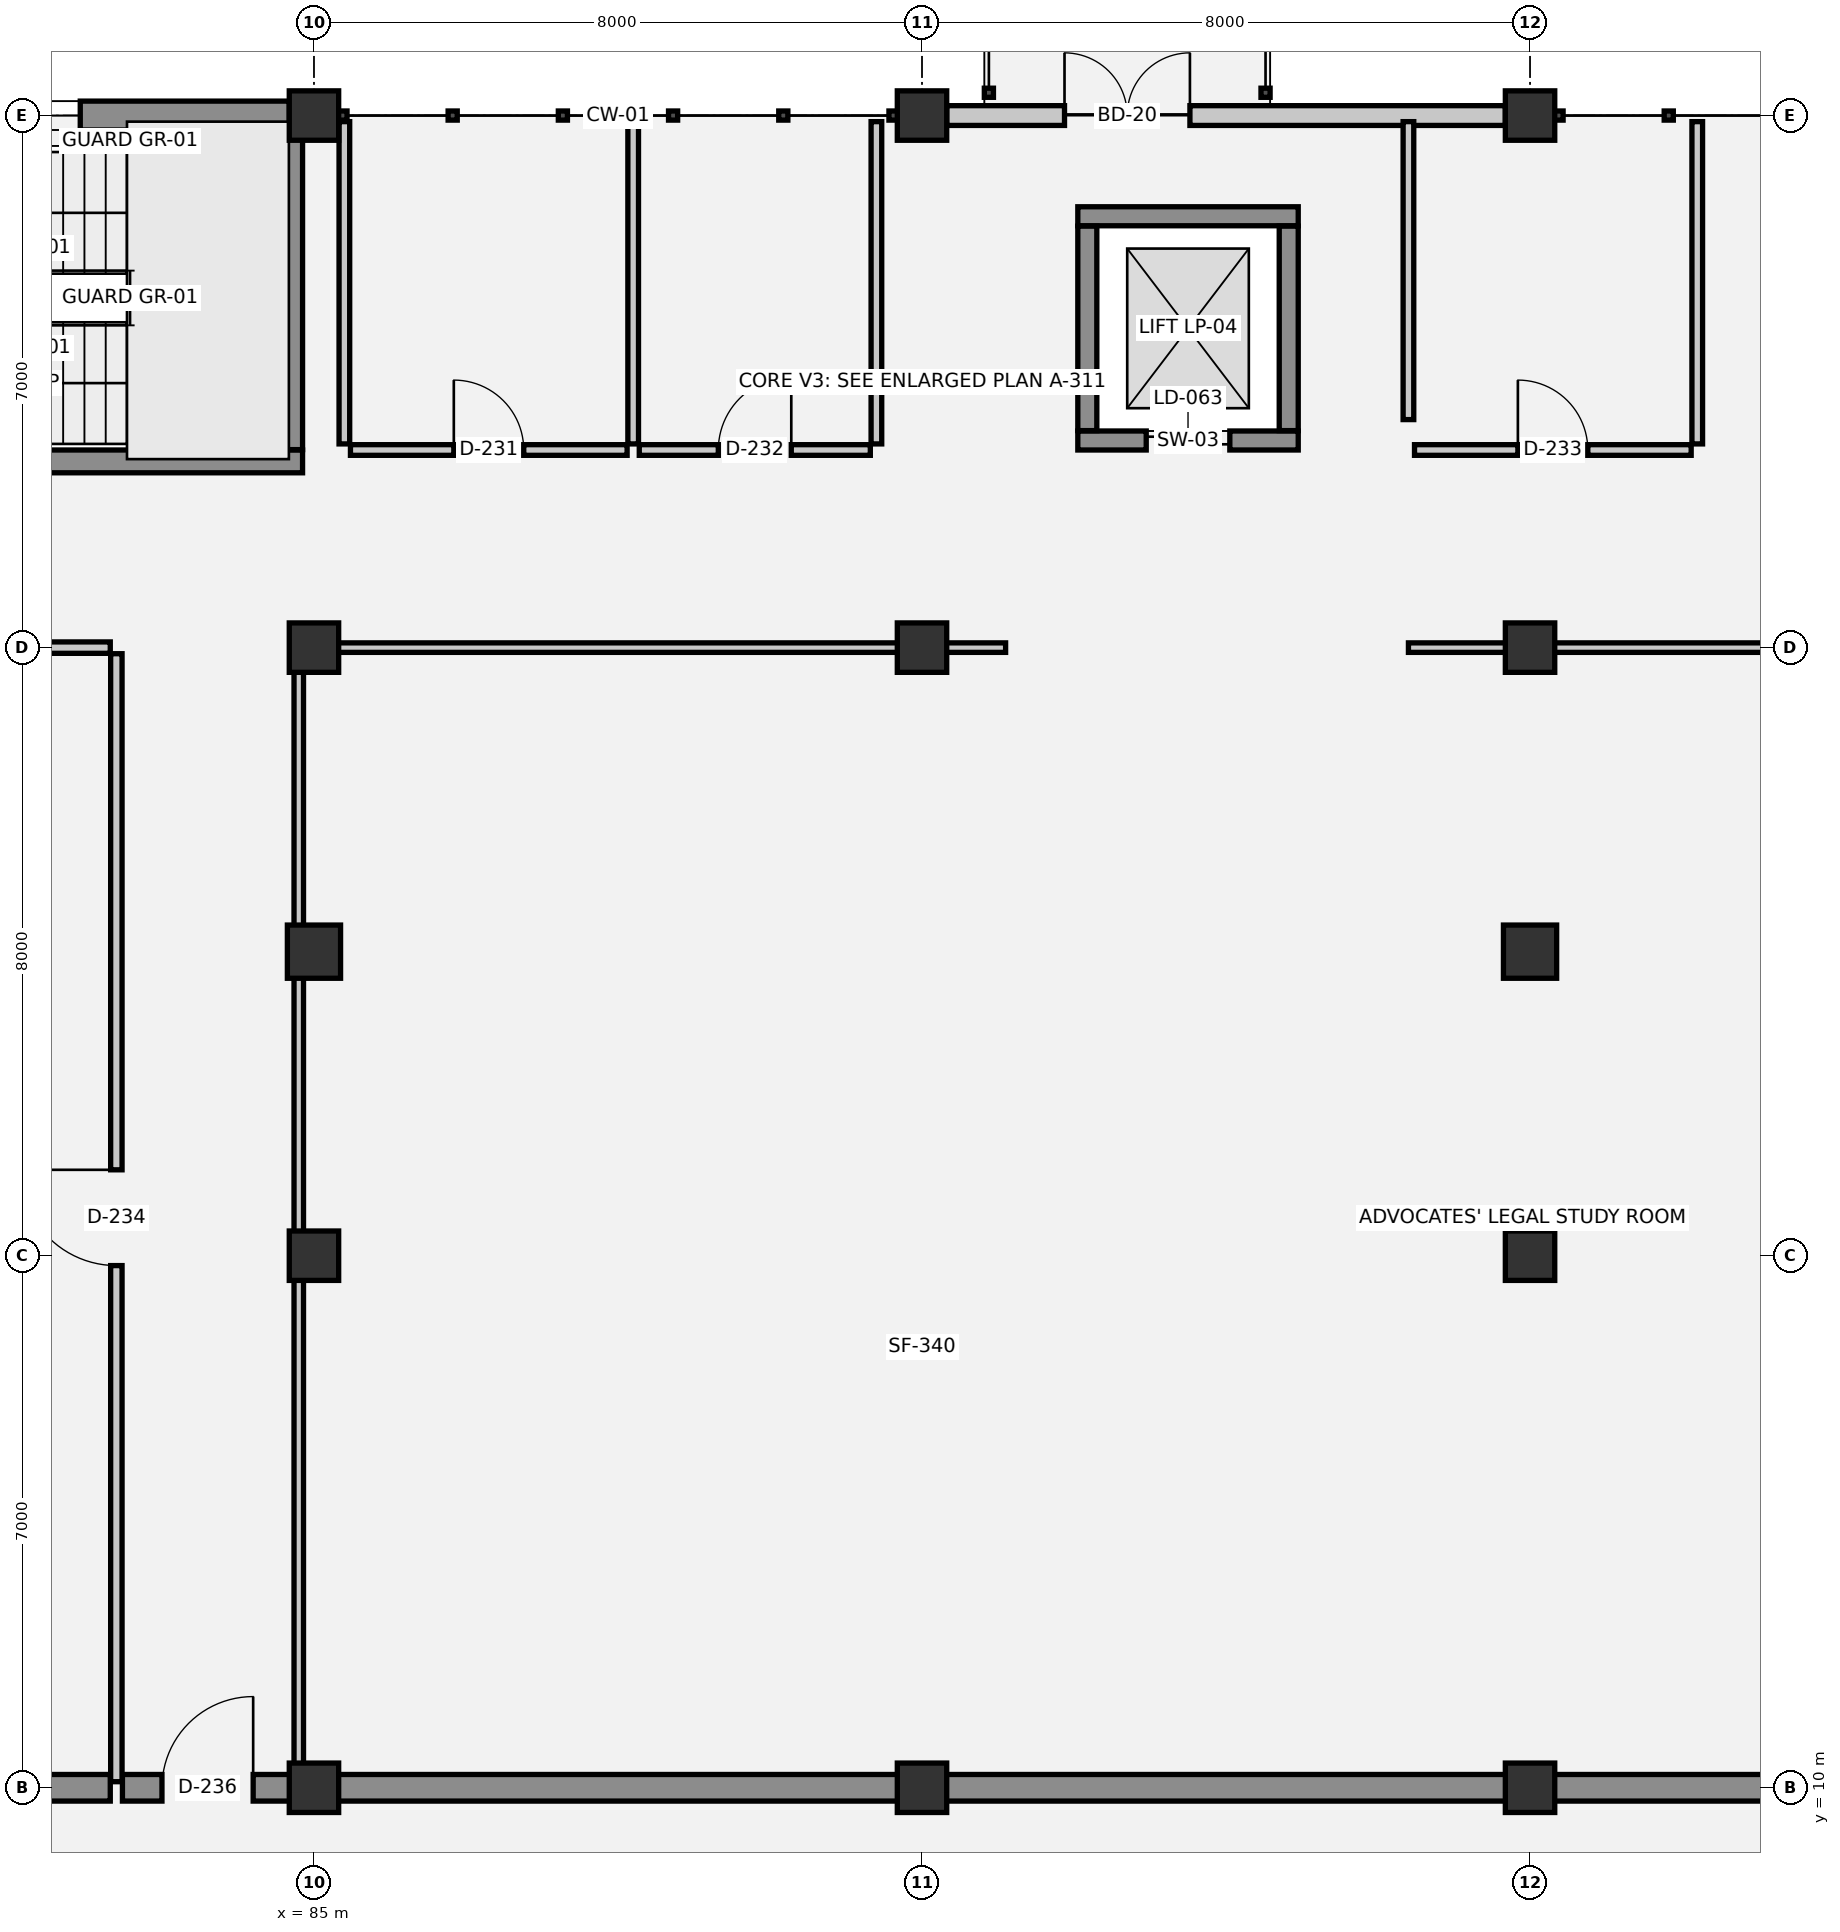
"""IFC4 building model, lengths in metres.
Left out: names, types, materials, properties, quantities, classifications, styles, units other than length and angle.
Written with IfcOpenShell. Run it as: python <this file> out.ifc"""

import sys

from ifc_helpers import new_model, si_unit, direction, frame, frame_2d, origin, origin_2d, place, context, subcontext, project, spatial, rectangle, circle, extrude, element, fill, save


model = new_model("IFC4")
c1 = context("Model", 3, precision=1e-05, world=origin(), true_north=direction((0.0, 1.0)))
c2 = subcontext(c1, "Body", "Model", "MODEL_VIEW")
j1 = project(units=[si_unit("LENGTHUNIT", "METRE"), si_unit("PLANEANGLEUNIT", "RADIAN")], contexts=[c1])
p1 = place(None, origin())
s1 = spatial("IfcSite", under=j1, at=p1, CompositionType="ELEMENT")
p2 = place(p1, origin())
s2 = spatial("IfcBuilding", under=s1, at=p2, CompositionType="ELEMENT")
p3 = place(p2, frame((0.0, 0.0, 5.4)))
s3 = spatial("IfcBuildingStorey", under=s2, at=p3, CompositionType="ELEMENT", Elevation=5.4)
for number, where, z_axis, x_axis in (
    (1, (85.0, 10.0, 0.0), (0.0, 0.0, 1.0), (1.0, 0.0, 0.0)),
    (2, (85.0, 17.0, 0.0), (0.0, 0.0, 1.0), (1.0, 0.0, 0.0)),
    (3, (85.0, 25.0, 0.0), (0.0, 0.0, 1.0), (1.0, 0.0, 0.0)),
    (4, (85.0, 32.0, 0.0), (0.0, 0.0, 1.0), (1.0, 0.0, 0.0)),
    (5, (93.0, 10.0, 0.0), (0.0, 0.0, 1.0), (1.0, 0.0, 0.0)),
    (6, (93.0, 25.0, 0.0), (0.0, 0.0, 1.0), (1.0, 0.0, 0.0)),
    (7, (93.0, 32.0, 0.0), (0.0, 0.0, 1.0), (1.0, 0.0, 0.0)),
    (8, (101.0, 10.0, 0.0), (0.0, 0.0, 1.0), (1.0, 0.0, 0.0)),
    (9, (101.0, 17.0, 0.0), (0.0, 0.0, 1.0), (1.0, 0.0, 0.0)),
    (10, (101.0, 25.0, 0.0), (0.0, 0.0, 1.0), (1.0, 0.0, 0.0)),
    (11, (101.0, 32.0, 0.0), (0.0, 0.0, 1.0), (1.0, 0.0, 0.0)),
):
    element("IfcColumn", number, at=place(p3, frame(where, z_axis=z_axis, x_axis=x_axis)), inside=s3, PredefinedType="COLUMN", context=c2, shape_type="SweptSolid", body=[
        extrude(rectangle(XDim=0.65, YDim=0.65, at=origin_2d()), origin(), (0.0, 0.0, 1.0), 4.5),
    ])
for number, where, z_axis, x_axis in (
    (12, (85.0, 21.0, 0.0), (0.0, 0.0, 1.0), (1.0, 0.0, 0.0)),
    (13, (101.0, 21.0, 0.0), (0.0, 0.0, 1.0), (1.0, 0.0, 0.0)),
):
    element("IfcColumn", number, at=place(p3, frame(where, z_axis=z_axis, x_axis=x_axis)), inside=s3, PredefinedType="COLUMN", context=c2, shape_type="SweptSolid", body=[
        extrude(circle(Radius=0.35, at=origin_2d()), origin(), (0.0, 0.0, 1.0), 4.5),
    ])
p4 = place(p3, frame((77.325, 32.0, 0.0), z_axis=(0.0, 0.0, 1.0), x_axis=(1.0, 0.0, 0.0)))
e14 = element("IfcWall", 14, at=p4, inside=s3, PredefinedType="STANDARD", context=c2, shape_type="SweptSolid", body=[
    extrude(rectangle(XDim=7.35, YDim=0.38, at=frame_2d((3.675, 0.0))), origin(), (0.0, 0.0, 1.0), 3.44),
])
p5 = place(p4, frame((2.75, 0.0, 0.95)))
e15 = element("IfcOpeningElement", 15, at=p5, cuts=e14, PredefinedType="OPENING", context=c2, shape_type="SweptSolid", body=[
    extrude(rectangle(XDim=1.85, YDim=1.8, at=frame_2d((0.925, 0.9))), frame((0.0, 0.2, 0.0), z_axis=(0.0, -1.0, 0.0), x_axis=(1.0, 0.0, 0.0)), (0.0, 0.0, 1.0), 0.4),
])
p6 = place(p3, frame((93.325, 32.0, 0.0), z_axis=(0.0, 0.0, 1.0), x_axis=(1.0, 0.0, 0.0)))
e16 = element("IfcWall", 16, at=p6, inside=s3, PredefinedType="SOLIDWALL", context=c2, shape_type="SweptSolid", body=[
    extrude(rectangle(XDim=7.35, YDim=0.26, at=frame_2d((3.675, 0.0))), origin(), (0.0, 0.0, 1.0), 3.44),
])
p7 = place(p6, frame((1.55, 0.0, 0.0)))
e17 = element("IfcOpeningElement", 17, at=p7, cuts=e16, PredefinedType="OPENING", context=c2, shape_type="SweptSolid", body=[
    extrude(rectangle(XDim=1.65, YDim=2.2, at=frame_2d((0.825, 1.1))), frame((0.0, 0.14, 0.0), z_axis=(0.0, -1.0, 0.0), x_axis=(1.0, 0.0, 0.0)), (0.0, 0.0, 1.0), 0.28),
])
p8 = place(p3, frame((95.05, 27.725, 0.0), z_axis=(0.0, 0.0, 1.0), x_axis=(1.0, 0.0, 0.0)))
e18 = element("IfcWall", 18, at=p8, inside=s3, PredefinedType="SHEAR", context=c2, shape_type="SweptSolid", body=[
    extrude(rectangle(XDim=2.9, YDim=0.25, at=frame_2d((1.45, 0.0))), origin(), (0.0, 0.0, 1.0), 4.5),
])
p9 = place(p8, frame((0.9, 0.0, 0.0)))
e19 = element("IfcOpeningElement", 19, at=p9, cuts=e18, PredefinedType="OPENING", context=c2, shape_type="SweptSolid", body=[
    extrude(rectangle(XDim=1.1, YDim=2.15, at=frame_2d((0.55, 1.075))), frame((0.0, 0.135, 0.0), z_axis=(0.0, -1.0, 0.0), x_axis=(1.0, 0.0, 0.0)), (0.0, 0.0, 1.0), 0.27),
])
p10 = place(p3, frame((97.95, 30.675, 0.0), z_axis=(0.0, 0.0, 1.0), x_axis=(-1.0, 0.0, 0.0)))
e20 = element("IfcWall", 20, at=p10, inside=s3, PredefinedType="SHEAR", context=c2, shape_type="SweptSolid", body=[
    extrude(rectangle(XDim=2.9, YDim=0.25, at=frame_2d((1.45, 0.0))), origin(), (0.0, 0.0, 1.0), 4.5),
])
for number, where, z_axis, x_axis in (
    (21, (95.175, 30.545, 0.0), (0.0, 0.0, 1.0), (0.0, -1.0, 0.0)),
    (22, (97.825, 27.855, 0.0), (0.0, 0.0, 1.0), (0.0, 1.0, 0.0)),
):
    element("IfcWall", number, at=place(p3, frame(where, z_axis=z_axis, x_axis=x_axis)), inside=s3, PredefinedType="SHEAR", context=c2, shape_type="SweptSolid", body=[
        extrude(rectangle(XDim=2.69, YDim=0.25, at=frame_2d((1.345, 0.0))), origin(), (0.0, 0.0, 1.0), 4.5),
    ])
p11 = place(p3, frame((77.15, 27.45, 0.0), z_axis=(0.0, 0.0, 1.0), x_axis=(1.0, 0.0, 0.0)))
e23 = element("IfcWall", 23, at=p11, inside=s3, PredefinedType="SHEAR", context=c2, shape_type="SweptSolid", body=[
    extrude(rectangle(XDim=7.7, YDim=0.3, at=frame_2d((3.85, 0.0))), origin(), (0.0, 0.0, 1.0), 4.16),
])
p12 = place(p11, frame((0.425, 0.0, 0.0)))
e24 = element("IfcOpeningElement", 24, at=p12, cuts=e23, PredefinedType="OPENING", context=c2, shape_type="SweptSolid", body=[
    extrude(rectangle(XDim=1.25, YDim=2.15, at=frame_2d((0.625, 1.075))), frame((0.0, 0.16, 0.0), z_axis=(0.0, -1.0, 0.0), x_axis=(1.0, 0.0, 0.0)), (0.0, 0.0, 1.0), 0.32),
])
p13 = place(p3, frame((84.7, 27.605, 0.0), z_axis=(0.0, 0.0, 1.0), x_axis=(0.0, 1.0, 0.0)))
e25 = element("IfcWall", 25, at=p13, inside=s3, PredefinedType="SHEAR", context=c2, shape_type="SweptSolid", body=[
    extrude(rectangle(XDim=4.2, YDim=0.3, at=frame_2d((2.1, 0.0))), origin(), (0.0, 0.0, 1.0), 4.16),
])
p14 = place(p3, frame((69.08, 10.0, 0.0), z_axis=(0.0, 0.0, 1.0), x_axis=(1.0, 0.0, 0.0)))
e26 = element("IfcWall", 26, at=p14, inside=s3, PredefinedType="SHEAR", context=c2, shape_type="SweptSolid", body=[
    extrude(rectangle(XDim=13.24, YDim=0.35, at=frame_2d((6.62, 0.0))), origin(), (0.0, 0.0, 1.0), 4.14),
])
p15 = place(p3, frame((82.48, 10.0, 0.0), z_axis=(0.0, 0.0, 1.0), x_axis=(1.0, 0.0, 0.0)))
e27 = element("IfcWall", 27, at=p15, inside=s3, PredefinedType="SHEAR", context=c2, shape_type="SweptSolid", body=[
    extrude(rectangle(XDim=2.24, YDim=0.35, at=frame_2d((1.12, 0.0))), origin(), (0.0, 0.0, 1.0), 4.14),
])
p16 = place(p15, frame((0.52, 0.0, 0.0)))
e28 = element("IfcOpeningElement", 28, at=p16, cuts=e27, PredefinedType="OPENING", context=c2, shape_type="SweptSolid", body=[
    extrude(rectangle(XDim=1.2, YDim=2.15, at=frame_2d((0.6, 1.075))), frame((0.0, 0.185, 0.0), z_axis=(0.0, -1.0, 0.0), x_axis=(1.0, 0.0, 0.0)), (0.0, 0.0, 1.0), 0.37),
])
p17 = place(p3, frame((84.88, 10.0, 0.0), z_axis=(0.0, 0.0, 1.0), x_axis=(1.0, 0.0, 0.0)))
e29 = element("IfcWall", 29, at=p17, inside=s3, PredefinedType="SHEAR", context=c2, shape_type="SweptSolid", body=[
    extrude(rectangle(XDim=32.04, YDim=0.35, at=frame_2d((16.02, 0.0))), origin(), (0.0, 0.0, 1.0), 4.14),
])
p18 = place(p3, frame((69.08, 25.0, 0.0), z_axis=(0.0, 0.0, 1.0), x_axis=(1.0, 0.0, 0.0)))
e30 = element("IfcWall", 30, at=p18, inside=s3, PredefinedType="PARTITIONING", context=c2, shape_type="SweptSolid", body=[
    extrude(rectangle(XDim=13.24, YDim=0.15, at=frame_2d((6.62, 0.0))), origin(), (0.0, 0.0, 1.0), 3.46),
])
p19 = place(p3, frame((84.88, 25.0, 0.0), z_axis=(0.0, 0.0, 1.0), x_axis=(1.0, 0.0, 0.0)))
e31 = element("IfcWall", 31, at=p19, inside=s3, PredefinedType="PARTITIONING", context=c2, shape_type="SweptSolid", body=[
    extrude(rectangle(XDim=9.22, YDim=0.125, at=frame_2d((4.61, 0.0))), origin(), (0.0, 0.0, 1.0), 3.46),
])
p20 = place(p3, frame((99.4, 25.0, 0.0), z_axis=(0.0, 0.0, 1.0), x_axis=(1.0, 0.0, 0.0)))
e32 = element("IfcWall", 32, at=p20, inside=s3, PredefinedType="PARTITIONING", context=c2, shape_type="SweptSolid", body=[
    extrude(rectangle(XDim=17.52, YDim=0.125, at=frame_2d((8.76, 0.0))), origin(), (0.0, 0.0, 1.0), 3.46),
])
p21 = place(p20, frame((5.789, 0.0, 0.0)))
e33 = element("IfcOpeningElement", 33, at=p21, cuts=e32, PredefinedType="OPENING", context=c2, shape_type="SweptSolid", body=[
    extrude(rectangle(XDim=1.28, YDim=2.2, at=frame_2d((0.64, 1.1))), frame((0.0, 0.073, 0.0), z_axis=(0.0, -1.0, 0.0), x_axis=(1.0, 0.0, 0.0)), (0.0, 0.0, 1.0), 0.145),
])
p22 = place(p3, frame((85.48, 27.6, 0.0), z_axis=(0.0, 0.0, 1.0), x_axis=(1.0, 0.0, 0.0)))
e34 = element("IfcWall", 34, at=p22, inside=s3, PredefinedType="PLUMBINGWALL", context=c2, shape_type="SweptSolid", body=[
    extrude(rectangle(XDim=3.64, YDim=0.14, at=frame_2d((1.82, 0.0))), origin(), (0.0, 0.0, 1.0), 4.14),
])
p23 = place(p22, frame((1.36, 0.0, 0.0)))
e35 = element("IfcOpeningElement", 35, at=p23, cuts=e34, PredefinedType="OPENING", context=c2, shape_type="SweptSolid", body=[
    extrude(rectangle(XDim=0.92, YDim=2.1, at=frame_2d((0.46, 1.05))), frame((0.0, 0.08, 0.0), z_axis=(0.0, -1.0, 0.0), x_axis=(1.0, 0.0, 0.0)), (0.0, 0.0, 1.0), 0.16),
])
p24 = place(p3, frame((89.28, 27.6, 0.0), z_axis=(0.0, 0.0, 1.0), x_axis=(1.0, 0.0, 0.0)))
e36 = element("IfcWall", 36, at=p24, inside=s3, PredefinedType="PLUMBINGWALL", context=c2, shape_type="SweptSolid", body=[
    extrude(rectangle(XDim=3.04, YDim=0.14, at=frame_2d((1.52, 0.0))), origin(), (0.0, 0.0, 1.0), 4.14),
])
p25 = place(p24, frame((1.04, 0.0, 0.0)))
e37 = element("IfcOpeningElement", 37, at=p25, cuts=e36, PredefinedType="OPENING", context=c2, shape_type="SweptSolid", body=[
    extrude(rectangle(XDim=0.96, YDim=2.1, at=frame_2d((0.48, 1.05))), frame((0.0, 0.08, 0.0), z_axis=(0.0, -1.0, 0.0), x_axis=(1.0, 0.0, 0.0)), (0.0, 0.0, 1.0), 0.16),
])
p26 = place(p3, frame((99.48, 27.6, 0.0), z_axis=(0.0, 0.0, 1.0), x_axis=(1.0, 0.0, 0.0)))
e38 = element("IfcWall", 38, at=p26, inside=s3, PredefinedType="PLUMBINGWALL", context=c2, shape_type="SweptSolid", body=[
    extrude(rectangle(XDim=3.64, YDim=0.14, at=frame_2d((1.82, 0.0))), origin(), (0.0, 0.0, 1.0), 4.14),
])
p27 = place(p26, frame((1.36, 0.0, 0.0)))
e39 = element("IfcOpeningElement", 39, at=p27, cuts=e38, PredefinedType="OPENING", context=c2, shape_type="SweptSolid", body=[
    extrude(rectangle(XDim=0.92, YDim=2.1, at=frame_2d((0.46, 1.05))), frame((0.0, 0.08, 0.0), z_axis=(0.0, -1.0, 0.0), x_axis=(1.0, 0.0, 0.0)), (0.0, 0.0, 1.0), 0.16),
])
p28 = place(p3, frame((82.4, 10.08, 0.0), z_axis=(0.0, 0.0, 1.0), x_axis=(0.0, 1.0, 0.0)))
e40 = element("IfcWall", 40, at=p28, inside=s3, PredefinedType="PARTITIONING", context=c2, shape_type="SweptSolid", body=[
    extrude(rectangle(XDim=14.84, YDim=0.15, at=frame_2d((7.42, 0.0))), origin(), (0.0, 0.0, 1.0), 4.14),
])
p29 = place(p28, frame((6.79, 0.0, 0.0)))
e41 = element("IfcOpeningElement", 41, at=p29, cuts=e40, PredefinedType="OPENING", context=c2, shape_type="SweptSolid", body=[
    extrude(rectangle(XDim=1.26, YDim=2.2, at=frame_2d((0.63, 1.1))), frame((0.0, 0.085, 0.0), z_axis=(0.0, -1.0, 0.0), x_axis=(1.0, 0.0, 0.0)), (0.0, 0.0, 1.0), 0.17),
])
p30 = place(p3, frame((84.8, 10.08, 0.0), z_axis=(0.0, 0.0, 1.0), x_axis=(0.0, 1.0, 0.0)))
e42 = element("IfcWall", 42, at=p30, inside=s3, PredefinedType="PARTITIONING", context=c2, shape_type="SweptSolid", body=[
    extrude(rectangle(XDim=14.84, YDim=0.125, at=frame_2d((7.42, 0.0))), origin(), (0.0, 0.0, 1.0), 3.61),
])
for number, where, z_axis, x_axis in (
    (43, (85.4, 27.68, 0.0), (0.0, 0.0, 1.0), (0.0, 1.0, 0.0)),
    (44, (89.2, 27.68, 0.0), (0.0, 0.0, 1.0), (0.0, 1.0, 0.0)),
    (45, (92.4, 27.68, 0.0), (0.0, 0.0, 1.0), (0.0, 1.0, 0.0)),
):
    element("IfcWall", number, at=place(p3, frame(where, z_axis=z_axis, x_axis=x_axis)), inside=s3, PredefinedType="PLUMBINGWALL", context=c2, shape_type="SweptSolid", body=[
        extrude(rectangle(XDim=4.24, YDim=0.14, at=frame_2d((2.12, 0.0))), origin(), (0.0, 0.0, 1.0), 4.14),
    ])
p31 = place(p3, frame((99.4, 28.0, 0.0), z_axis=(0.0, 0.0, 1.0), x_axis=(0.0, 1.0, 0.0)))
e46 = element("IfcWall", 46, at=p31, inside=s3, PredefinedType="PLUMBINGWALL", context=c2, shape_type="SweptSolid", body=[
    extrude(rectangle(XDim=3.92, YDim=0.14, at=frame_2d((1.96, 0.0))), origin(), (0.0, 0.0, 1.0), 4.14),
])
p32 = place(p3, frame((103.2, 27.68, 0.0), z_axis=(0.0, 0.0, 1.0), x_axis=(0.0, 1.0, 0.0)))
e47 = element("IfcWall", 47, at=p32, inside=s3, PredefinedType="PLUMBINGWALL", context=c2, shape_type="SweptSolid", body=[
    extrude(rectangle(XDim=4.24, YDim=0.14, at=frame_2d((2.12, 0.0))), origin(), (0.0, 0.0, 1.0), 4.14),
])
p33 = place(p7, origin())
e48 = element("IfcDoor", 48, at=p33, inside=s3, OperationType="DOUBLE_DOOR_SINGLE_SWING", PredefinedType="DOOR", context=c2, shape_type="SweptSolid", body=[
    extrude(rectangle(XDim=1.65, YDim=2.2, at=frame_2d((0.825, 1.1))), frame((0.0, 0.025, 0.0), z_axis=(0.0, -1.0, 0.0), x_axis=(1.0, 0.0, 0.0)), (0.0, 0.0, 1.0), 0.05),
])
fill(e17, e48)
p34 = place(p9, origin())
e49 = element("IfcDoor", 49, at=p34, inside=s3, OperationType="DOUBLE_DOOR_SLIDING", PredefinedType="DOOR", context=c2, shape_type="SweptSolid", body=[
    extrude(rectangle(XDim=1.1, YDim=2.15, at=frame_2d((0.55, 1.075))), frame((0.0, 0.025, 0.0), z_axis=(0.0, -1.0, 0.0), x_axis=(1.0, 0.0, 0.0)), (0.0, 0.0, 1.0), 0.05),
])
fill(e19, e49)
p35 = place(p23, origin())
e50 = element("IfcDoor", 50, at=p35, inside=s3, OperationType="SINGLE_SWING_LEFT", PredefinedType="DOOR", context=c2, shape_type="SweptSolid", body=[
    extrude(rectangle(XDim=0.92, YDim=2.1, at=frame_2d((0.46, 1.05))), frame((0.0, 0.025, 0.0), z_axis=(0.0, -1.0, 0.0), x_axis=(1.0, 0.0, 0.0)), (0.0, 0.0, 1.0), 0.05),
])
fill(e35, e50)
p36 = place(p25, origin())
e51 = element("IfcDoor", 51, at=p36, inside=s3, OperationType="SINGLE_SWING_RIGHT", PredefinedType="DOOR", context=c2, shape_type="SweptSolid", body=[
    extrude(rectangle(XDim=0.96, YDim=2.1, at=frame_2d((0.48, 1.05))), frame((0.0, 0.025, 0.0), z_axis=(0.0, -1.0, 0.0), x_axis=(1.0, 0.0, 0.0)), (0.0, 0.0, 1.0), 0.05),
])
fill(e37, e51)
p37 = place(p27, origin())
e52 = element("IfcDoor", 52, at=p37, inside=s3, OperationType="SINGLE_SWING_LEFT", PredefinedType="DOOR", context=c2, shape_type="SweptSolid", body=[
    extrude(rectangle(XDim=0.92, YDim=2.1, at=frame_2d((0.46, 1.05))), frame((0.0, 0.025, 0.0), z_axis=(0.0, -1.0, 0.0), x_axis=(1.0, 0.0, 0.0)), (0.0, 0.0, 1.0), 0.05),
])
fill(e39, e52)
p38 = place(p29, origin())
e53 = element("IfcDoor", 53, at=p38, inside=s3, OperationType="SINGLE_SWING_RIGHT", PredefinedType="DOOR", context=c2, shape_type="SweptSolid", body=[
    extrude(rectangle(XDim=1.26, YDim=2.2, at=frame_2d((0.63, 1.1))), frame((0.0, 0.025, 0.0), z_axis=(0.0, -1.0, 0.0), x_axis=(1.0, 0.0, 0.0)), (0.0, 0.0, 1.0), 0.05),
])
fill(e41, e53)
p39 = place(p16, origin())
e54 = element("IfcDoor", 54, at=p39, inside=s3, OperationType="SINGLE_SWING_RIGHT", PredefinedType="DOOR", context=c2, shape_type="SweptSolid", body=[
    extrude(rectangle(XDim=1.2, YDim=2.15, at=frame_2d((0.6, 1.075))), frame((0.0, 0.025, 0.0), z_axis=(0.0, -1.0, 0.0), x_axis=(1.0, 0.0, 0.0)), (0.0, 0.0, 1.0), 0.05),
])
fill(e28, e54)
p40 = place(p5, origin())
e55 = element("IfcWindow", 55, at=p40, inside=s3, PartitioningType="SINGLE_PANEL", PredefinedType="WINDOW", context=c2, shape_type="SweptSolid", body=[
    extrude(rectangle(XDim=1.85, YDim=1.8, at=frame_2d((0.925, 0.9))), frame((0.0, 0.03, 0.0), z_axis=(0.0, -1.0, 0.0), x_axis=(1.0, 0.0, 0.0)), (0.0, 0.0, 1.0), 0.06),
])
fill(e15, e55)
save(model, sys.argv[1])
